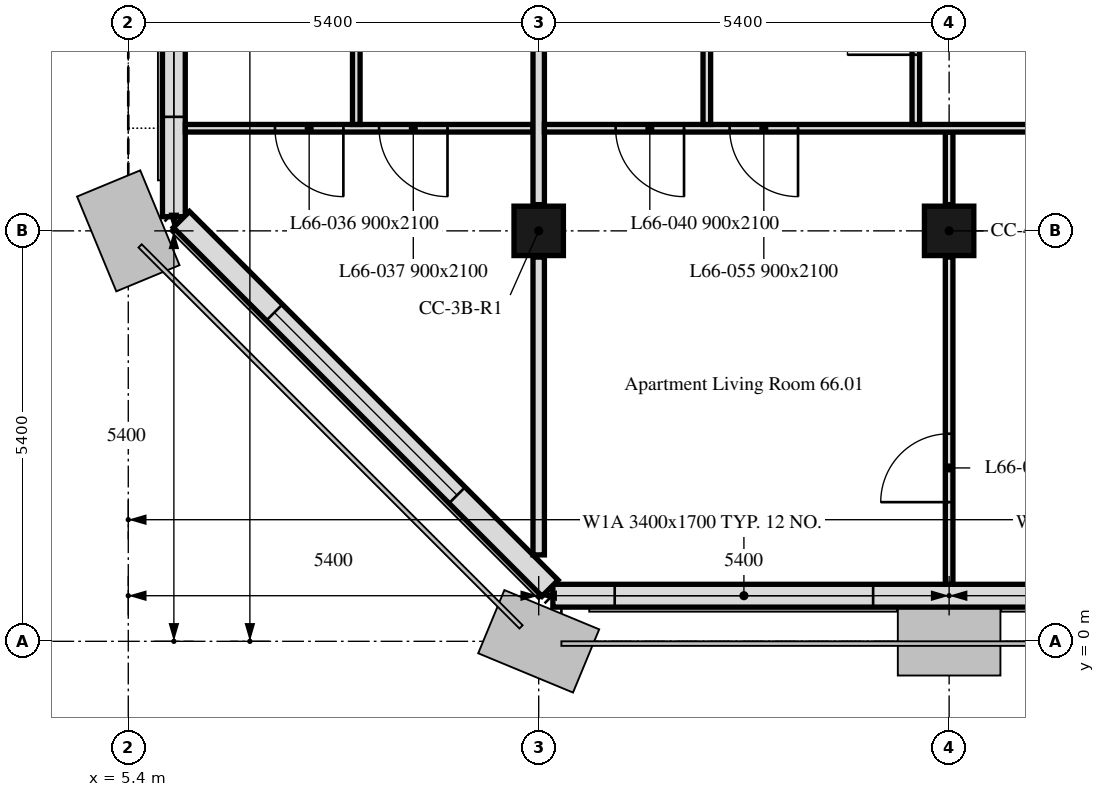
"""IFC4 building model, lengths in metres.
Left out: names, types, materials, properties, quantities, classifications, styles, units other than length and angle.
Written with IfcOpenShell. Run it as: python <this file> out.ifc"""

import sys

from ifc_helpers import new_model, si_unit, direction, frame, frame_2d, origin, origin_2d, place, context, subcontext, project, spatial, rectangle, extrude, element, fill, save


model = new_model("IFC4")
c1 = context("Model", 3, precision=1e-05, world=origin(), true_north=direction((0.0, 1.0)))
c2 = subcontext(c1, "Body", "Model", "MODEL_VIEW")
j1 = project(units=[si_unit("LENGTHUNIT", "METRE"), si_unit("PLANEANGLEUNIT", "RADIAN")], contexts=[c1])
p1 = place(None, origin())
s1 = spatial("IfcSite", under=j1, at=p1, CompositionType="ELEMENT")
p2 = place(p1, origin())
s2 = spatial("IfcBuilding", under=s1, at=p2, CompositionType="ELEMENT")
p3 = place(p2, frame((0.0, 0.0, 271.9)))
s3 = spatial("IfcBuildingStorey", under=s2, at=p3, CompositionType="ELEMENT", Elevation=271.9)
for number, where, z_axis, x_axis in (
    (1, (10.8, 5.4, 0.0), (0.0, 0.0, 1.0), (1.0, 0.0, 0.0)),
    (2, (16.2, 5.4, 0.0), (0.0, 0.0, 1.0), (1.0, 0.0, 0.0)),
):
    element("IfcColumn", number, at=place(p3, frame(where, z_axis=z_axis, x_axis=x_axis)), inside=s3, PredefinedType="COLUMN", context=c2, shape_type="SweptSolid", body=[
        extrude(rectangle(XDim=0.65, YDim=0.65, at=origin_2d()), origin(), (0.0, 0.0, 1.0), 3.0),
    ])
p4 = place(p3, frame((10.986, 0.6, 0.0), z_axis=(0.0, 0.0, 1.0), x_axis=(1.0, 0.0, 0.0)))
e3 = element("IfcWall", 3, at=p4, inside=s3, PredefinedType="SOLIDWALL", context=c2, shape_type="SweptSolid", body=[
    extrude(rectangle(XDim=32.027, YDim=0.3, at=frame_2d((16.014, 0.0))), origin(), (0.0, 0.0, 1.0), 3.0),
])
p5 = place(p4, frame((0.814, 0.0, 0.9)))
e4 = element("IfcOpeningElement", 4, at=p5, cuts=e3, PredefinedType="OPENING", context=c2, shape_type="SweptSolid", body=[
    extrude(rectangle(XDim=3.4, YDim=1.7, at=frame_2d((1.7, 0.85))), frame((0.0, 0.16, 0.0), z_axis=(0.0, -1.0, 0.0), x_axis=(1.0, 0.0, 0.0)), (0.0, 0.0, 1.0), 0.32),
])
p6 = place(p4, frame((6.564, 0.0, 0.9)))
e5 = element("IfcOpeningElement", 5, at=p6, cuts=e3, PredefinedType="OPENING", context=c2, shape_type="SweptSolid", body=[
    extrude(rectangle(XDim=1.1, YDim=1.7, at=frame_2d((0.55, 0.85))), frame((0.0, 0.16, 0.0), z_axis=(0.0, -1.0, 0.0), x_axis=(1.0, 0.0, 0.0)), (0.0, 0.0, 1.0), 0.32),
])
p7 = place(p4, frame((11.614, 0.0, 0.9)))
e6 = element("IfcOpeningElement", 6, at=p7, cuts=e3, PredefinedType="OPENING", context=c2, shape_type="SweptSolid", body=[
    extrude(rectangle(XDim=3.4, YDim=1.7, at=frame_2d((1.7, 0.85))), frame((0.0, 0.16, 0.0), z_axis=(0.0, -1.0, 0.0), x_axis=(1.0, 0.0, 0.0)), (0.0, 0.0, 1.0), 0.32),
])
p8 = place(p4, frame((17.364, 0.0, 0.9)))
e7 = element("IfcOpeningElement", 7, at=p8, cuts=e3, PredefinedType="OPENING", context=c2, shape_type="SweptSolid", body=[
    extrude(rectangle(XDim=1.1, YDim=1.7, at=frame_2d((0.55, 0.85))), frame((0.0, 0.16, 0.0), z_axis=(0.0, -1.0, 0.0), x_axis=(1.0, 0.0, 0.0)), (0.0, 0.0, 1.0), 0.32),
])
p9 = place(p4, frame((22.414, 0.0, 0.9)))
e8 = element("IfcOpeningElement", 8, at=p9, cuts=e3, PredefinedType="OPENING", context=c2, shape_type="SweptSolid", body=[
    extrude(rectangle(XDim=3.4, YDim=1.7, at=frame_2d((1.7, 0.85))), frame((0.0, 0.16, 0.0), z_axis=(0.0, -1.0, 0.0), x_axis=(1.0, 0.0, 0.0)), (0.0, 0.0, 1.0), 0.32),
])
p10 = place(p4, frame((28.164, 0.0, 0.9)))
e9 = element("IfcOpeningElement", 9, at=p10, cuts=e3, PredefinedType="OPENING", context=c2, shape_type="SweptSolid", body=[
    extrude(rectangle(XDim=1.1, YDim=1.7, at=frame_2d((0.55, 0.85))), frame((0.0, 0.16, 0.0), z_axis=(0.0, -1.0, 0.0), x_axis=(1.0, 0.0, 0.0)), (0.0, 0.0, 1.0), 0.32),
])
p11 = place(p3, frame((6.0, 16.2, 0.0), z_axis=(0.0, 0.0, 1.0), x_axis=(0.0, -1.0, 0.0)))
e10 = element("IfcWall", 10, at=p11, inside=s3, PredefinedType="SOLIDWALL", context=c2, shape_type="SweptSolid", body=[
    extrude(rectangle(XDim=10.614, YDim=0.3, at=frame_2d((5.307, 0.0))), origin(), (0.0, 0.0, 1.0), 3.0),
])
p12 = place(p11, frame((1.0, 0.0, 0.9)))
e11 = element("IfcOpeningElement", 11, at=p12, cuts=e10, PredefinedType="OPENING", context=c2, shape_type="SweptSolid", body=[
    extrude(rectangle(XDim=1.1, YDim=1.7, at=frame_2d((0.55, 0.85))), frame((0.0, 0.16, 0.0), z_axis=(0.0, -1.0, 0.0), x_axis=(1.0, 0.0, 0.0)), (0.0, 0.0, 1.0), 0.32),
])
p13 = place(p11, frame((2.95, 0.0, 0.9)))
e12 = element("IfcOpeningElement", 12, at=p13, cuts=e10, PredefinedType="OPENING", context=c2, shape_type="SweptSolid", body=[
    extrude(rectangle(XDim=1.1, YDim=1.7, at=frame_2d((0.55, 0.85))), frame((0.0, 0.16, 0.0), z_axis=(0.0, -1.0, 0.0), x_axis=(1.0, 0.0, 0.0)), (0.0, 0.0, 1.0), 0.32),
])
p14 = place(p11, frame((6.75, 0.0, 0.9)))
e13 = element("IfcOpeningElement", 13, at=p14, cuts=e10, PredefinedType="OPENING", context=c2, shape_type="SweptSolid", body=[
    extrude(rectangle(XDim=1.1, YDim=1.7, at=frame_2d((0.55, 0.85))), frame((0.0, 0.16, 0.0), z_axis=(0.0, -1.0, 0.0), x_axis=(1.0, 0.0, 0.0)), (0.0, 0.0, 1.0), 0.32),
])
p15 = place(p11, frame((8.2, 0.0, 0.9)))
e14 = element("IfcOpeningElement", 14, at=p15, cuts=e10, PredefinedType="OPENING", context=c2, shape_type="SweptSolid", body=[
    extrude(rectangle(XDim=1.1, YDim=1.7, at=frame_2d((0.55, 0.85))), frame((0.0, 0.16, 0.0), z_axis=(0.0, -1.0, 0.0), x_axis=(1.0, 0.0, 0.0)), (0.0, 0.0, 1.0), 0.32),
])
p16 = place(p3, frame((6.099, 5.55, 0.0), z_axis=(0.0, 0.0, 1.0), x_axis=(0.707106781187, -0.707106781187, 0.0)))
e15 = element("IfcWall", 15, at=p16, inside=s3, PredefinedType="SOLIDWALL", context=c2, shape_type="SweptSolid", body=[
    extrude(rectangle(XDim=6.86, YDim=0.3, at=frame_2d((3.43, 0.0))), origin(), (0.0, 0.0, 1.0), 3.0),
])
p17 = place(p16, frame((1.73, 0.0, 0.9)))
e16 = element("IfcOpeningElement", 16, at=p17, cuts=e15, PredefinedType="OPENING", context=c2, shape_type="SweptSolid", body=[
    extrude(rectangle(XDim=3.4, YDim=1.7, at=frame_2d((1.7, 0.85))), frame((0.0, 0.16, 0.0), z_axis=(0.0, -1.0, 0.0), x_axis=(1.0, 0.0, 0.0)), (0.0, 0.0, 1.0), 0.32),
])
p18 = place(p3, frame((10.8, 1.137, 0.0), z_axis=(0.0, 0.0, 1.0), x_axis=(0.0, 1.0, 0.0)))
e17 = element("IfcWall", 17, at=p18, inside=s3, PredefinedType="PARTITIONING", context=c2, shape_type="SweptSolid", body=[
    extrude(rectangle(XDim=3.918, YDim=0.15, at=frame_2d((1.959, 0.0))), origin(), (0.0, 0.0, 1.0), 3.0),
])
p19 = place(p3, frame((10.725, 6.75, 0.0), z_axis=(0.0, 0.0, 1.0), x_axis=(-1.0, 0.0, 0.0)))
e18 = element("IfcWall", 18, at=p19, inside=s3, PredefinedType="PARTITIONING", context=c2, shape_type="SweptSolid", body=[
    extrude(rectangle(XDim=4.574, YDim=0.1, at=frame_2d((2.287, 0.0))), origin(), (0.0, 0.0, 1.0), 3.0),
])
p20 = place(p19, frame((2.495, 0.0, 0.0)))
e19 = element("IfcOpeningElement", 19, at=p20, cuts=e18, PredefinedType="OPENING", context=c2, shape_type="SweptSolid", body=[
    extrude(rectangle(XDim=0.9, YDim=2.1, at=frame_2d((0.45, 1.05))), frame((0.0, 0.05, 0.0), z_axis=(0.0, -1.0, 0.0), x_axis=(1.0, 0.0, 0.0)), (0.0, 0.0, 1.0), 0.1),
])
p21 = place(p19, frame((1.125, 0.0, 0.0)))
e20 = element("IfcOpeningElement", 20, at=p21, cuts=e18, PredefinedType="OPENING", context=c2, shape_type="SweptSolid", body=[
    extrude(rectangle(XDim=0.9, YDim=2.1, at=frame_2d((0.45, 1.05))), frame((0.0, 0.05, 0.0), z_axis=(0.0, -1.0, 0.0), x_axis=(1.0, 0.0, 0.0)), (0.0, 0.0, 1.0), 0.1),
])
p22 = place(p3, frame((8.4, 6.8, 0.0), z_axis=(0.0, 0.0, 1.0), x_axis=(0.0, 1.0, 0.0)))
e21 = element("IfcWall", 21, at=p22, inside=s3, PredefinedType="PARTITIONING", context=c2, shape_type="SweptSolid", body=[
    extrude(rectangle(XDim=7.075, YDim=0.1, at=frame_2d((3.538, 0.0))), origin(), (0.0, 0.0, 1.0), 3.0),
])
p23 = place(p22, frame((5.45, 0.0, 0.0)))
e22 = element("IfcOpeningElement", 22, at=p23, cuts=e21, PredefinedType="OPENING", context=c2, shape_type="SweptSolid", body=[
    extrude(rectangle(XDim=0.9, YDim=2.1, at=frame_2d((0.45, 1.05))), frame((0.0, 0.05, 0.0), z_axis=(0.0, -1.0, 0.0), x_axis=(1.0, 0.0, 0.0)), (0.0, 0.0, 1.0), 0.1),
])
p24 = place(p22, frame((1.717, 0.0, 0.0)))
e23 = element("IfcOpeningElement", 23, at=p24, cuts=e21, PredefinedType="OPENING", context=c2, shape_type="SweptSolid", body=[
    extrude(rectangle(XDim=0.9, YDim=2.1, at=frame_2d((0.45, 1.05))), frame((0.0, 0.05, 0.0), z_axis=(0.0, -1.0, 0.0), x_axis=(1.0, 0.0, 0.0)), (0.0, 0.0, 1.0), 0.1),
])
p25 = place(p3, frame((10.8, 5.745, 0.0), z_axis=(0.0, 0.0, 1.0), x_axis=(0.0, 1.0, 0.0)))
e24 = element("IfcWall", 24, at=p25, inside=s3, PredefinedType="PARTITIONING", context=c2, shape_type="SweptSolid", body=[
    extrude(rectangle(XDim=4.71, YDim=0.15, at=frame_2d((2.355, 0.0))), origin(), (0.0, 0.0, 1.0), 3.0),
])
p26 = place(p3, frame((16.2, 0.751, 0.0), z_axis=(0.0, 0.0, 1.0), x_axis=(0.0, 1.0, 0.0)))
e25 = element("IfcWall", 25, at=p26, inside=s3, PredefinedType="PARTITIONING", context=c2, shape_type="SweptSolid", body=[
    extrude(rectangle(XDim=4.304, YDim=0.1, at=frame_2d((2.152, 0.0))), origin(), (0.0, 0.0, 1.0), 2.4),
])
p27 = place(p26, frame((1.08, 0.0, 0.0)))
e26 = element("IfcOpeningElement", 26, at=p27, cuts=e25, PredefinedType="OPENING", context=c2, shape_type="SweptSolid", body=[
    extrude(rectangle(XDim=0.9, YDim=2.1, at=frame_2d((0.45, 1.05))), frame((0.0, 0.05, 0.0), z_axis=(0.0, -1.0, 0.0), x_axis=(1.0, 0.0, 0.0)), (0.0, 0.0, 1.0), 0.1),
])
p28 = place(p3, frame((16.2, 5.745, 0.0), z_axis=(0.0, 0.0, 1.0), x_axis=(0.0, 1.0, 0.0)))
e27 = element("IfcWall", 27, at=p28, inside=s3, PredefinedType="PARTITIONING", context=c2, shape_type="SweptSolid", body=[
    extrude(rectangle(XDim=0.955, YDim=0.1, at=frame_2d((0.478, 0.0))), origin(), (0.0, 0.0, 1.0), 2.4),
])
p29 = place(p3, frame((21.525, 6.75, 0.0), z_axis=(0.0, 0.0, 1.0), x_axis=(-1.0, 0.0, 0.0)))
e28 = element("IfcWall", 28, at=p29, inside=s3, PredefinedType="PARTITIONING", context=c2, shape_type="SweptSolid", body=[
    extrude(rectangle(XDim=10.65, YDim=0.1, at=frame_2d((5.325, 0.0))), origin(), (0.0, 0.0, 1.0), 2.4),
])
p30 = place(p29, frame((8.813, 0.0, 0.0)))
e29 = element("IfcOpeningElement", 29, at=p30, cuts=e28, PredefinedType="OPENING", context=c2, shape_type="SweptSolid", body=[
    extrude(rectangle(XDim=0.9, YDim=2.1, at=frame_2d((0.45, 1.05))), frame((0.0, 0.05, 0.0), z_axis=(0.0, -1.0, 0.0), x_axis=(1.0, 0.0, 0.0)), (0.0, 0.0, 1.0), 0.1),
])
p31 = place(p29, frame((1.675, 0.0, 0.0)))
e30 = element("IfcOpeningElement", 30, at=p31, cuts=e28, PredefinedType="OPENING", context=c2, shape_type="SweptSolid", body=[
    extrude(rectangle(XDim=0.9, YDim=2.1, at=frame_2d((0.45, 1.05))), frame((0.0, 0.05, 0.0), z_axis=(0.0, -1.0, 0.0), x_axis=(1.0, 0.0, 0.0)), (0.0, 0.0, 1.0), 0.1),
])
p32 = place(p29, frame((7.313, 0.0, 0.0)))
e31 = element("IfcOpeningElement", 31, at=p32, cuts=e28, PredefinedType="OPENING", context=c2, shape_type="SweptSolid", body=[
    extrude(rectangle(XDim=0.9, YDim=2.1, at=frame_2d((0.45, 1.05))), frame((0.0, 0.05, 0.0), z_axis=(0.0, -1.0, 0.0), x_axis=(1.0, 0.0, 0.0)), (0.0, 0.0, 1.0), 0.1),
])
p33 = place(p3, frame((13.012, 6.8, 0.0), z_axis=(0.0, 0.0, 1.0), x_axis=(0.0, 1.0, 0.0)))
e32 = element("IfcWall", 32, at=p33, inside=s3, PredefinedType="PARTITIONING", context=c2, shape_type="SweptSolid", body=[
    extrude(rectangle(XDim=7.075, YDim=0.1, at=frame_2d((3.538, 0.0))), origin(), (0.0, 0.0, 1.0), 3.0),
])
p34 = place(p33, frame((5.617, 0.0, 0.0)))
e33 = element("IfcOpeningElement", 33, at=p34, cuts=e32, PredefinedType="OPENING", context=c2, shape_type="SweptSolid", body=[
    extrude(rectangle(XDim=0.9, YDim=2.1, at=frame_2d((0.45, 1.05))), frame((0.0, 0.05, 0.0), z_axis=(0.0, -1.0, 0.0), x_axis=(1.0, 0.0, 0.0)), (0.0, 0.0, 1.0), 0.1),
])
p35 = place(p33, frame((1.45, 0.0, 0.0)))
e34 = element("IfcOpeningElement", 34, at=p35, cuts=e32, PredefinedType="OPENING", context=c2, shape_type="SweptSolid", body=[
    extrude(rectangle(XDim=0.9, YDim=2.1, at=frame_2d((0.45, 1.05))), frame((0.0, 0.05, 0.0), z_axis=(0.0, -1.0, 0.0), x_axis=(1.0, 0.0, 0.0)), (0.0, 0.0, 1.0), 0.1),
])
p36 = place(p3, frame((15.762, 6.8, 0.0), z_axis=(0.0, 0.0, 1.0), x_axis=(0.0, 1.0, 0.0)))
e35 = element("IfcWall", 35, at=p36, inside=s3, PredefinedType="PARTITIONING", context=c2, shape_type="SweptSolid", body=[
    extrude(rectangle(XDim=7.075, YDim=0.1, at=frame_2d((3.538, 0.0))), origin(), (0.0, 0.0, 1.0), 3.0),
])
p37 = place(p36, frame((0.917, 0.0, 0.0)))
e36 = element("IfcOpeningElement", 36, at=p37, cuts=e35, PredefinedType="OPENING", context=c2, shape_type="SweptSolid", body=[
    extrude(rectangle(XDim=0.9, YDim=2.1, at=frame_2d((0.45, 1.05))), frame((0.0, 0.05, 0.0), z_axis=(0.0, -1.0, 0.0), x_axis=(1.0, 0.0, 0.0)), (0.0, 0.0, 1.0), 0.1),
])
p38 = place(p36, frame((5.925, 0.0, 0.0)))
e37 = element("IfcOpeningElement", 37, at=p38, cuts=e35, PredefinedType="OPENING", context=c2, shape_type="SweptSolid", body=[
    extrude(rectangle(XDim=0.9, YDim=2.1, at=frame_2d((0.45, 1.05))), frame((0.0, 0.05, 0.0), z_axis=(0.0, -1.0, 0.0), x_axis=(1.0, 0.0, 0.0)), (0.0, 0.0, 1.0), 0.1),
])
p39 = place(p5, origin())
e38 = element("IfcWindow", 38, at=p39, inside=s3, PartitioningType="SINGLE_PANEL", PredefinedType="WINDOW", context=c2, shape_type="SweptSolid", body=[
    extrude(rectangle(XDim=3.4, YDim=1.7, at=frame_2d((1.7, 0.85))), frame((0.0, 0.03, 0.0), z_axis=(0.0, -1.0, 0.0), x_axis=(1.0, 0.0, 0.0)), (0.0, 0.0, 1.0), 0.06),
])
fill(e4, e38)
p40 = place(p15, origin())
e39 = element("IfcWindow", 39, at=p40, inside=s3, PartitioningType="SINGLE_PANEL", PredefinedType="WINDOW", context=c2, shape_type="SweptSolid", body=[
    extrude(rectangle(XDim=1.1, YDim=1.7, at=frame_2d((0.55, 0.85))), frame((0.0, 0.03, 0.0), z_axis=(0.0, -1.0, 0.0), x_axis=(1.0, 0.0, 0.0)), (0.0, 0.0, 1.0), 0.06),
])
fill(e14, e39)
p41 = place(p17, origin())
e40 = element("IfcWindow", 40, at=p41, inside=s3, PartitioningType="SINGLE_PANEL", PredefinedType="WINDOW", context=c2, shape_type="SweptSolid", body=[
    extrude(rectangle(XDim=3.4, YDim=1.7, at=frame_2d((1.7, 0.85))), frame((0.0, 0.03, 0.0), z_axis=(0.0, -1.0, 0.0), x_axis=(1.0, 0.0, 0.0)), (0.0, 0.0, 1.0), 0.06),
])
fill(e16, e40)
p42 = place(p37, origin())
e41 = element("IfcDoor", 41, at=p42, inside=s3, OperationType="SINGLE_SWING_RIGHT", PredefinedType="DOOR", context=c2, shape_type="SweptSolid", body=[
    extrude(rectangle(XDim=0.9, YDim=2.1, at=frame_2d((0.45, 1.05))), frame((0.0, 0.025, 0.0), z_axis=(0.0, -1.0, 0.0), x_axis=(1.0, 0.0, 0.0)), (0.0, 0.0, 1.0), 0.05),
])
fill(e36, e41)
p43 = place(p20, origin())
e42 = element("IfcDoor", 42, at=p43, inside=s3, OperationType="SINGLE_SWING_RIGHT", PredefinedType="DOOR", context=c2, shape_type="SweptSolid", body=[
    extrude(rectangle(XDim=0.9, YDim=2.1, at=frame_2d((0.45, 1.05))), frame((0.0, 0.025, 0.0), z_axis=(0.0, -1.0, 0.0), x_axis=(1.0, 0.0, 0.0)), (0.0, 0.0, 1.0), 0.05),
])
fill(e19, e42)
p44 = place(p21, origin())
e43 = element("IfcDoor", 43, at=p44, inside=s3, OperationType="SINGLE_SWING_LEFT", PredefinedType="DOOR", context=c2, shape_type="SweptSolid", body=[
    extrude(rectangle(XDim=0.9, YDim=2.1, at=frame_2d((0.45, 1.05))), frame((0.0, 0.025, 0.0), z_axis=(0.0, -1.0, 0.0), x_axis=(1.0, 0.0, 0.0)), (0.0, 0.0, 1.0), 0.05),
])
fill(e20, e43)
p45 = place(p27, origin())
e44 = element("IfcDoor", 44, at=p45, inside=s3, OperationType="SINGLE_SWING_LEFT", PredefinedType="DOOR", context=c2, shape_type="SweptSolid", body=[
    extrude(rectangle(XDim=0.9, YDim=2.1, at=frame_2d((0.45, 1.05))), frame((0.0, 0.025, 0.0), z_axis=(0.0, -1.0, 0.0), x_axis=(1.0, 0.0, 0.0)), (0.0, 0.0, 1.0), 0.05),
])
fill(e26, e44)
p46 = place(p30, origin())
e45 = element("IfcDoor", 45, at=p46, inside=s3, OperationType="SINGLE_SWING_RIGHT", PredefinedType="DOOR", context=c2, shape_type="SweptSolid", body=[
    extrude(rectangle(XDim=0.9, YDim=2.1, at=frame_2d((0.45, 1.05))), frame((0.0, 0.025, 0.0), z_axis=(0.0, -1.0, 0.0), x_axis=(1.0, 0.0, 0.0)), (0.0, 0.0, 1.0), 0.05),
])
fill(e29, e45)
p47 = place(p32, origin())
e46 = element("IfcDoor", 46, at=p47, inside=s3, OperationType="SINGLE_SWING_LEFT", PredefinedType="DOOR", context=c2, shape_type="SweptSolid", body=[
    extrude(rectangle(XDim=0.9, YDim=2.1, at=frame_2d((0.45, 1.05))), frame((0.0, 0.025, 0.0), z_axis=(0.0, -1.0, 0.0), x_axis=(1.0, 0.0, 0.0)), (0.0, 0.0, 1.0), 0.05),
])
fill(e31, e46)
save(model, sys.argv[1])
